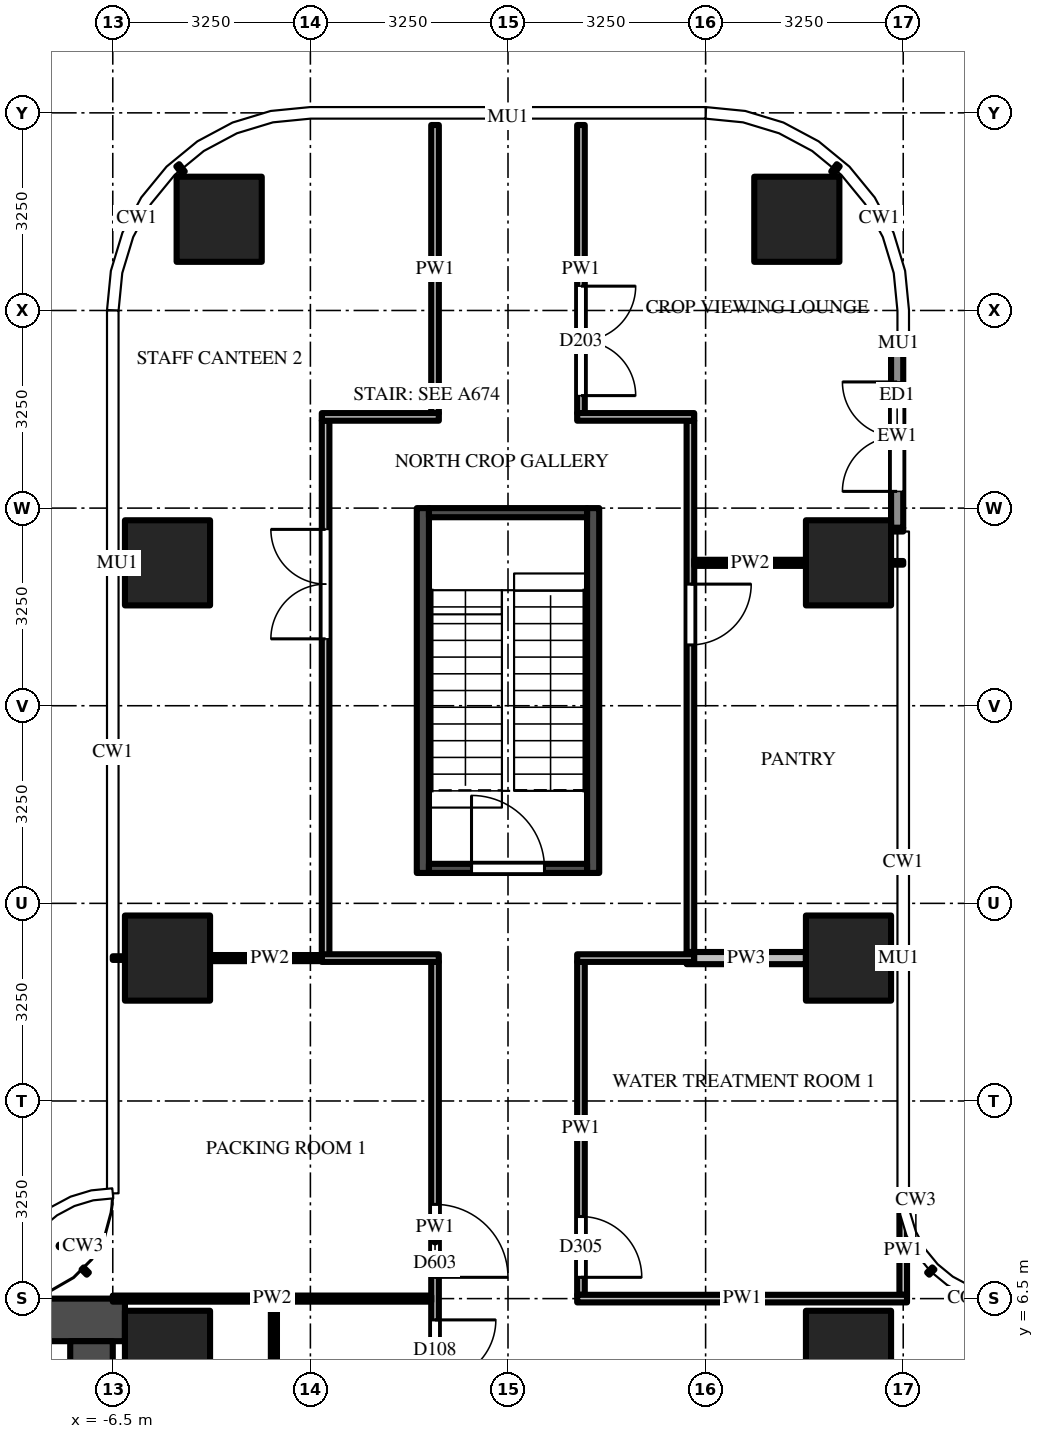
"""IFC4 building model, lengths in metres.
Left out: names, types, materials, properties, quantities, classifications, styles, units other than length and angle.
Written with IfcOpenShell. Run it as: python <this file> out.ifc"""

import sys

from ifc_helpers import new_model, si_unit, direction, frame, frame_2d, origin, origin_2d, place, context, subcontext, project, spatial, rectangle, extrude, source, transform, mapped, element, fill, save


model = new_model("IFC4")
c1 = context("Model", 3, precision=1e-05, world=origin(), true_north=direction((0.0, 1.0)))
c2 = subcontext(c1, "Body", "Model", "MODEL_VIEW")
j1 = project(units=[si_unit("LENGTHUNIT", "METRE"), si_unit("PLANEANGLEUNIT", "RADIAN")], contexts=[c1])
p1 = place(None, origin())
s1 = spatial("IfcSite", under=j1, at=p1, CompositionType="ELEMENT")
p2 = place(p1, origin())
s2 = spatial("IfcBuilding", under=s1, at=p2, CompositionType="ELEMENT")
p3 = place(p2, frame((0.0, 0.0, 83.5)))
s3 = spatial("IfcBuildingStorey", under=s2, at=p3, CompositionType="ELEMENT", Elevation=83.5)
m1 = source(origin(), c2, "Body", "SweptSolid", [
    extrude(rectangle(XDim=1.4, YDim=1.4, at=origin_2d()), origin(), (0.0, 0.0, 1.0), 4.5),
])
for number, where, z_axis, x_axis in (
    (1, (-5.6, 12.1, 0.0), (0.0, 0.0, 1.0), (1.0, 0.0, 0.0)),
    (2, (-5.6, 18.6, 0.0), (0.0, 0.0, 1.0), (1.0, 0.0, 0.0)),
    (3, (-4.75, 24.25, 0.0), (0.0, 0.0, 1.0), (1.0, 0.0, 0.0)),
    (4, (5.6, 12.1, 0.0), (0.0, 0.0, 1.0), (1.0, 0.0, 0.0)),
    (5, (5.6, 18.6, 0.0), (0.0, 0.0, 1.0), (1.0, 0.0, 0.0)),
    (6, (4.75, 24.25, 0.0), (0.0, 0.0, 1.0), (1.0, 0.0, 0.0)),
    (7, (5.6, 5.6, 0.0), (0.0, 0.0, 1.0), (1.0, 0.0, 0.0)),
    (8, (-5.6, 5.6, 0.0), (0.0, 0.0, 1.0), (1.0, 0.0, 0.0)),
):
    element("IfcColumn", number, at=place(p3, frame(where, z_axis=z_axis, x_axis=x_axis)), inside=s3, PredefinedType="COLUMN", context=c2, shape_type="MappedRepresentation", body=[
        mapped(m1, transform((0.0, 0.0, 0.0))),
    ])
m2 = source(origin(), c2, "Body", "SweptSolid", [
    extrude(rectangle(XDim=16.45, YDim=0.7, at=frame_2d((8.225, 0.0))), origin(), (0.0, 0.0, 1.0), 4.25),
])
p4 = place(p3, frame((-6.3, 6.15, 0.0), z_axis=(0.0, 0.0, 1.0), x_axis=(-1.0, 0.0, 0.0)))
e9 = element("IfcWall", 9, at=p4, inside=s3, PredefinedType="SHEAR", context=c2, shape_type="MappedRepresentation", body=[
    mapped(m2, transform((0.0, 0.0, 0.0))),
])
m3 = source(origin(), c2, "Body", "SweptSolid", [
    extrude(rectangle(XDim=9.05, YDim=0.7, at=frame_2d((4.525, 0.0))), origin(), (0.0, 0.0, 1.0), 4.25),
])
p5 = place(p3, frame((-6.85, 5.8, 0.0), z_axis=(0.0, 0.0, 1.0), x_axis=(0.0, -1.0, 0.0)))
e10 = element("IfcWall", 10, at=p5, inside=s3, PredefinedType="SHEAR", context=c2, shape_type="MappedRepresentation", body=[
    mapped(m3, transform((0.0, 0.0, 0.0))),
])
m4 = source(origin(), c2, "Body", "SweptSolid", [
    extrude(rectangle(XDim=1.8, YDim=2.1, at=frame_2d((0.9, 1.05))), frame((0.0, 0.36, 0.0), z_axis=(0.0, -1.0, 0.0), x_axis=(1.0, 0.0, 0.0)), (0.0, 0.0, 1.0), 0.72),
])
p6 = place(p5, frame((3.15, 0.0, 0.0)))
e11 = element("IfcOpeningElement", 11, at=p6, cuts=e10, PredefinedType="OPENING", context=c2, shape_type="MappedRepresentation", body=[
    mapped(m4, transform((0.0, 0.0, 0.0))),
])
m5 = source(origin(), c2, "Body", "SweptSolid", [
    extrude(rectangle(XDim=6.0, YDim=0.2, at=frame_2d((3.0, 0.0))), origin(), (0.0, 0.0, 1.0), 4.25),
])
for number, where, z_axis, x_axis in (
    (12, (-1.4, 13.5, 0.0), (0.0, 0.0, 1.0), (0.0, 1.0, 0.0)),
    (13, (1.4, 13.5, 0.0), (0.0, 0.0, 1.0), (0.0, 1.0, 0.0)),
):
    element("IfcWall", number, at=place(p3, frame(where, z_axis=z_axis, x_axis=x_axis)), inside=s3, PredefinedType="SHEAR", context=c2, shape_type="MappedRepresentation", body=[
        mapped(m5, transform((0.0, 0.0, 0.0))),
    ])
m6 = source(origin(), c2, "Body", "SweptSolid", [
    extrude(rectangle(XDim=2.6, YDim=0.15, at=frame_2d((1.3, 0.0))), origin(), (0.0, 0.0, 1.0), 4.25),
])
p7 = place(p3, frame((-1.3, 13.575, 0.0), z_axis=(0.0, 0.0, 1.0), x_axis=(1.0, 0.0, 0.0)))
e14 = element("IfcWall", 14, at=p7, inside=s3, PredefinedType="SHEAR", context=c2, shape_type="MappedRepresentation", body=[
    mapped(m6, transform((0.0, 0.0, 0.0))),
])
m7 = source(origin(), c2, "Body", "SweptSolid", [
    extrude(rectangle(XDim=1.2, YDim=2.1, at=frame_2d((0.6, 1.05))), frame((0.0, 0.085, 0.0), z_axis=(0.0, -1.0, 0.0), x_axis=(1.0, 0.0, 0.0)), (0.0, 0.0, 1.0), 0.17),
])
p8 = place(p7, frame((0.7, 0.0, 0.0)))
e15 = element("IfcOpeningElement", 15, at=p8, cuts=e14, PredefinedType="OPENING", context=c2, shape_type="MappedRepresentation", body=[
    mapped(m7, transform((0.0, 0.0, 0.0))),
])
p9 = place(p3, frame((-1.3, 19.425, 0.0), z_axis=(0.0, 0.0, 1.0), x_axis=(1.0, 0.0, 0.0)))
e16 = element("IfcWall", 16, at=p9, inside=s3, PredefinedType="SHEAR", context=c2, shape_type="MappedRepresentation", body=[
    mapped(m6, transform((0.0, 0.0, 0.0))),
])
m8 = source(origin(), c2, "Body", "SweptSolid", [
    extrude(rectangle(XDim=3.0, YDim=0.2, at=frame_2d((1.5, 0.0))), origin(), (0.0, 0.0, 1.0), 4.25),
])
p10 = place(p3, frame((6.4, 19.175, 0.0), z_axis=(0.0, 0.0, 1.0), x_axis=(0.0, 1.0, 0.0)))
e17 = element("IfcWall", 17, at=p10, inside=s3, PredefinedType="SOLIDWALL", context=c2, shape_type="MappedRepresentation", body=[
    mapped(m8, transform((0.0, 0.0, 0.0))),
])
m9 = source(origin(), c2, "Body", "SweptSolid", [
    extrude(rectangle(XDim=1.8, YDim=2.4, at=frame_2d((0.9, 1.2))), frame((0.0, 0.11, 0.0), z_axis=(0.0, -1.0, 0.0), x_axis=(1.0, 0.0, 0.0)), (0.0, 0.0, 1.0), 0.22),
])
p11 = place(p10, frame((0.6, 0.0, 0.0)))
e18 = element("IfcOpeningElement", 18, at=p11, cuts=e17, PredefinedType="OPENING", context=c2, shape_type="MappedRepresentation", body=[
    mapped(m9, transform((0.0, 0.0, 0.0))),
])
m10 = source(origin(), c2, "Body", "SweptSolid", [
    extrude(rectangle(XDim=3.137, YDim=0.1, at=frame_2d((1.569, 0.0))), origin(), (0.0, 0.0, 1.0), 3.468),
])
p12 = place(p3, frame((-3.85, 3.312, 0.0), z_axis=(0.0, 0.0, 1.0), x_axis=(0.0, 1.0, 0.0)))
e19 = element("IfcWall", 19, at=p12, inside=s3, PredefinedType="PARTITIONING", context=c2, shape_type="MappedRepresentation", body=[
    mapped(m10, transform((0.0, 0.0, 0.0))),
])
m11 = source(origin(), c2, "Body", "SweptSolid", [
    extrude(rectangle(XDim=8.788, YDim=0.125, at=frame_2d((4.394, 0.0))), origin(), (0.0, 0.0, 1.0), 3.468),
])
p13 = place(p3, frame((-3.0, 12.15, 0.0), z_axis=(0.0, 0.0, 1.0), x_axis=(0.0, 1.0, 0.0)))
e20 = element("IfcWall", 20, at=p13, inside=s3, PredefinedType="PARTITIONING", context=c2, shape_type="MappedRepresentation", body=[
    mapped(m11, transform((0.0, 0.0, 0.0))),
])
m12 = source(origin(), c2, "Body", "SweptSolid", [
    extrude(rectangle(XDim=1.8, YDim=2.1, at=frame_2d((0.9, 1.05))), frame((0.0, 0.073, 0.0), z_axis=(0.0, -1.0, 0.0), x_axis=(1.0, 0.0, 0.0)), (0.0, 0.0, 1.0), 0.145),
])
p14 = place(p13, frame((5.2, 0.0, 0.0)))
e21 = element("IfcOpeningElement", 21, at=p14, cuts=e20, PredefinedType="OPENING", context=c2, shape_type="MappedRepresentation", body=[
    mapped(m12, transform((0.0, 0.0, 0.0))),
])
m13 = source(origin(), c2, "Body", "SweptSolid", [
    extrude(rectangle(XDim=8.725, YDim=0.125, at=frame_2d((4.363, 0.0))), origin(), (0.0, 0.0, 1.0), 3.468),
])
p15 = place(p3, frame((-1.2, 12.038, 0.0), z_axis=(0.0, 0.0, 1.0), x_axis=(0.0, -1.0, 0.0)))
e22 = element("IfcWall", 22, at=p15, inside=s3, PredefinedType="PARTITIONING", context=c2, shape_type="MappedRepresentation", body=[
    mapped(m13, transform((0.0, 0.0, 0.0))),
])
m14 = source(origin(), c2, "Body", "SweptSolid", [
    extrude(rectangle(XDim=1.0, YDim=2.1, at=frame_2d((0.5, 1.05))), frame((0.0, 0.073, 0.0), z_axis=(0.0, -1.0, 0.0), x_axis=(1.0, 0.0, 0.0)), (0.0, 0.0, 1.0), 0.145),
])
p16 = place(p15, frame((5.887, 0.0, 0.0)))
e23 = element("IfcOpeningElement", 23, at=p16, cuts=e22, PredefinedType="OPENING", context=c2, shape_type="MappedRepresentation", body=[
    mapped(m14, transform((0.0, 0.0, 0.0))),
])
m15 = source(origin(), c2, "Body", "SweptSolid", [
    extrude(rectangle(XDim=1.2, YDim=2.1, at=frame_2d((0.6, 1.05))), frame((0.0, 0.073, 0.0), z_axis=(0.0, -1.0, 0.0), x_axis=(1.0, 0.0, 0.0)), (0.0, 0.0, 1.0), 0.145),
])
p17 = place(p15, frame((3.988, 0.0, 0.0)))
e24 = element("IfcOpeningElement", 24, at=p17, cuts=e22, PredefinedType="OPENING", context=c2, shape_type="MappedRepresentation", body=[
    mapped(m15, transform((0.0, 0.0, 0.0))),
])
m16 = source(origin(), c2, "Body", "SweptSolid", [
    extrude(rectangle(XDim=4.738, YDim=0.125, at=frame_2d((2.369, 0.0))), origin(), (0.0, 0.0, 1.0), 3.33),
])
p18 = place(p3, frame((-1.2, 25.8, 0.0), z_axis=(0.0, 0.0, 1.0), x_axis=(0.0, -1.0, 0.0)))
e25 = element("IfcWall", 25, at=p18, inside=s3, PredefinedType="PARTITIONING", context=c2, shape_type="MappedRepresentation", body=[
    mapped(m16, transform((0.0, 0.0, 0.0))),
])
m17 = source(origin(), c2, "Body", "SweptSolid", [
    extrude(rectangle(XDim=5.475, YDim=0.125, at=frame_2d((2.738, 0.0))), origin(), (0.0, 0.0, 1.0), 3.468),
])
p19 = place(p3, frame((1.2, 12.038, 0.0), z_axis=(0.0, 0.0, 1.0), x_axis=(0.0, -1.0, 0.0)))
e26 = element("IfcWall", 26, at=p19, inside=s3, PredefinedType="PARTITIONING", context=c2, shape_type="MappedRepresentation", body=[
    mapped(m17, transform((0.0, 0.0, 0.0))),
])
p20 = place(p19, frame((4.188, 0.0, 0.0)))
e27 = element("IfcOpeningElement", 27, at=p20, cuts=e26, PredefinedType="OPENING", context=c2, shape_type="MappedRepresentation", body=[
    mapped(m14, transform((0.0, 0.0, 0.0))),
])
p21 = place(p3, frame((1.2, 25.8, 0.0), z_axis=(0.0, 0.0, 1.0), x_axis=(0.0, -1.0, 0.0)))
e28 = element("IfcWall", 28, at=p21, inside=s3, PredefinedType="PARTITIONING", context=c2, shape_type="MappedRepresentation", body=[
    mapped(m16, transform((0.0, 0.0, 0.0))),
])
p22 = place(p21, frame((2.65, 0.0, 0.0)))
e29 = element("IfcOpeningElement", 29, at=p22, cuts=e28, PredefinedType="OPENING", context=c2, shape_type="MappedRepresentation", body=[
    mapped(m12, transform((0.0, 0.0, 0.0))),
])
m18 = source(origin(), c2, "Body", "SweptSolid", [
    extrude(rectangle(XDim=8.738, YDim=0.125, at=frame_2d((4.369, 0.0))), origin(), (0.0, 0.0, 1.0), 3.468),
])
p23 = place(p3, frame((3.0, 20.938, 0.0), z_axis=(0.0, 0.0, 1.0), x_axis=(0.0, -1.0, 0.0)))
e30 = element("IfcWall", 30, at=p23, inside=s3, PredefinedType="PARTITIONING", context=c2, shape_type="MappedRepresentation", body=[
    mapped(m18, transform((0.0, 0.0, 0.0))),
])
p24 = place(p23, frame((2.688, 0.0, 0.0)))
e31 = element("IfcOpeningElement", 31, at=p24, cuts=e30, PredefinedType="OPENING", context=c2, shape_type="MappedRepresentation", body=[
    mapped(m14, transform((0.0, 0.0, 0.0))),
])
m19 = source(origin(), c2, "Body", "SweptSolid", [
    extrude(rectangle(XDim=1.469, YDim=0.125, at=frame_2d((0.734, 0.0))), origin(), (0.0, 0.0, 1.0), 4.25),
])
p25 = place(p3, frame((6.5, 6.562, 0.0), z_axis=(0.0, 0.0, 1.0), x_axis=(0.0, 1.0, 0.0)))
e32 = element("IfcWall", 32, at=p25, inside=s3, PredefinedType="PARTITIONING", context=c2, shape_type="MappedRepresentation", body=[
    mapped(m19, transform((0.0, 0.0, 0.0))),
])
m20 = source(origin(), c2, "Body", "SweptSolid", [
    extrude(rectangle(XDim=5.238, YDim=0.1, at=frame_2d((2.619, 0.0))), origin(), (0.0, 0.0, 1.0), 3.33),
])
p26 = place(p3, frame((-6.5, 6.5, 0.0), z_axis=(0.0, 0.0, 1.0), x_axis=(1.0, 0.0, 0.0)))
e33 = element("IfcWall", 33, at=p26, inside=s3, PredefinedType="PARTITIONING", context=c2, shape_type="MappedRepresentation", body=[
    mapped(m20, transform((0.0, 0.0, 0.0))),
])
m21 = source(origin(), c2, "Body", "SweptSolid", [
    extrude(rectangle(XDim=5.425, YDim=0.125, at=frame_2d((2.712, 0.0))), origin(), (0.0, 0.0, 1.0), 3.33),
])
p27 = place(p3, frame((1.137, 6.5, 0.0), z_axis=(0.0, 0.0, 1.0), x_axis=(1.0, 0.0, 0.0)))
e34 = element("IfcWall", 34, at=p27, inside=s3, PredefinedType="PARTITIONING", context=c2, shape_type="MappedRepresentation", body=[
    mapped(m21, transform((0.0, 0.0, 0.0))),
])
m22 = source(origin(), c2, "Body", "SweptSolid", [
    extrude(rectangle(XDim=1.962, YDim=0.2, at=frame_2d((0.981, 0.0))), origin(), (0.0, 0.0, 1.0), 3.468),
])
p28 = place(p3, frame((2.938, 12.1, 0.0), z_axis=(0.0, 0.0, 1.0), x_axis=(1.0, 0.0, 0.0)))
e35 = element("IfcWall", 35, at=p28, inside=s3, PredefinedType="PARTITIONING", context=c2, shape_type="MappedRepresentation", body=[
    mapped(m22, transform((0.0, 0.0, 0.0))),
])
m23 = source(origin(), c2, "Body", "SweptSolid", [
    extrude(rectangle(XDim=1.962, YDim=0.1, at=frame_2d((0.981, 0.0))), origin(), (0.0, 0.0, 1.0), 3.468),
])
p29 = place(p3, frame((-4.9, 12.1, 0.0), z_axis=(0.0, 0.0, 1.0), x_axis=(1.0, 0.0, 0.0)))
e36 = element("IfcWall", 36, at=p29, inside=s3, PredefinedType="PARTITIONING", context=c2, shape_type="MappedRepresentation", body=[
    mapped(m23, transform((0.0, 0.0, 0.0))),
])
m24 = source(origin(), c2, "Body", "SweptSolid", [
    extrude(rectangle(XDim=1.925, YDim=0.125, at=frame_2d((0.962, 0.0))), origin(), (0.0, 0.0, 1.0), 3.468),
])
for number, where, z_axis, x_axis in (
    (37, (-1.137, 12.1, 0.0), (0.0, 0.0, 1.0), (-1.0, 0.0, 0.0)),
    (38, (3.062, 12.1, 0.0), (0.0, 0.0, 1.0), (-1.0, 0.0, 0.0)),
):
    element("IfcWall", number, at=place(p3, frame(where, z_axis=z_axis, x_axis=x_axis)), inside=s3, PredefinedType="PARTITIONING", context=c2, shape_type="MappedRepresentation", body=[
        mapped(m24, transform((0.0, 0.0, 0.0))),
    ])
m25 = source(origin(), c2, "Body", "SweptSolid", [
    extrude(rectangle(XDim=1.837, YDim=0.1, at=frame_2d((0.919, 0.0))), origin(), (0.0, 0.0, 1.0), 3.697),
])
p30 = place(p3, frame((3.062, 18.6, 0.0), z_axis=(0.0, 0.0, 1.0), x_axis=(1.0, 0.0, 0.0)))
e39 = element("IfcWall", 39, at=p30, inside=s3, PredefinedType="PARTITIONING", context=c2, shape_type="MappedRepresentation", body=[
    mapped(m25, transform((0.0, 0.0, 0.0))),
])
m26 = source(origin(), c2, "Body", "SweptSolid", [
    extrude(rectangle(XDim=1.925, YDim=0.125, at=frame_2d((0.962, 0.0))), origin(), (0.0, 0.0, 1.0), 4.25),
])
for number, where, z_axis, x_axis in (
    (40, (-3.062, 21.0, 0.0), (0.0, 0.0, 1.0), (1.0, 0.0, 0.0)),
    (41, (1.137, 21.0, 0.0), (0.0, 0.0, 1.0), (1.0, 0.0, 0.0)),
):
    element("IfcWall", number, at=place(p3, frame(where, z_axis=z_axis, x_axis=x_axis)), inside=s3, PredefinedType="PARTITIONING", context=c2, shape_type="MappedRepresentation", body=[
        mapped(m26, transform((0.0, 0.0, 0.0))),
    ])
m27 = source(origin(), c2, "Body", "SweptSolid", [
    extrude(rectangle(XDim=1.2, YDim=2.1, at=frame_2d((0.6, 1.05))), frame((0.0, 0.025, 0.0), z_axis=(0.0, -1.0, 0.0), x_axis=(1.0, 0.0, 0.0)), (0.0, 0.0, 1.0), 0.05),
])
p31 = place(p8, origin())
e42 = element("IfcDoor", 42, at=p31, inside=s3, OperationType="SINGLE_SWING_LEFT", PredefinedType="DOOR", context=c2, shape_type="MappedRepresentation", body=[
    mapped(m27, transform((0.0, 0.0, 0.0))),
])
fill(e15, e42)
m28 = source(origin(), c2, "Body", "SweptSolid", [
    extrude(rectangle(XDim=1.8, YDim=2.4, at=frame_2d((0.9, 1.2))), frame((0.0, 0.025, 0.0), z_axis=(0.0, -1.0, 0.0), x_axis=(1.0, 0.0, 0.0)), (0.0, 0.0, 1.0), 0.05),
])
p32 = place(p11, origin())
e43 = element("IfcDoor", 43, at=p32, inside=s3, OperationType="DOUBLE_DOOR_SINGLE_SWING", PredefinedType="DOOR", context=c2, shape_type="MappedRepresentation", body=[
    mapped(m28, transform((0.0, 0.0, 0.0))),
])
fill(e18, e43)
m29 = source(origin(), c2, "Body", "SweptSolid", [
    extrude(rectangle(XDim=1.0, YDim=2.1, at=frame_2d((0.5, 1.05))), frame((0.0, 0.025, 0.0), z_axis=(0.0, -1.0, 0.0), x_axis=(1.0, 0.0, 0.0)), (0.0, 0.0, 1.0), 0.05),
])
p33 = place(p16, origin())
e44 = element("IfcDoor", 44, at=p33, inside=s3, OperationType="SINGLE_SWING_LEFT", PredefinedType="DOOR", context=c2, shape_type="MappedRepresentation", body=[
    mapped(m29, transform((0.0, 0.0, 0.0))),
])
fill(e23, e44)
p34 = place(p20, origin())
e45 = element("IfcDoor", 45, at=p34, inside=s3, OperationType="SINGLE_SWING_RIGHT", PredefinedType="DOOR", context=c2, shape_type="MappedRepresentation", body=[
    mapped(m29, transform((0.0, 0.0, 0.0))),
])
fill(e27, e45)
p35 = place(p17, origin())
e46 = element("IfcDoor", 46, at=p35, inside=s3, OperationType="SINGLE_SWING_RIGHT", PredefinedType="DOOR", context=c2, shape_type="MappedRepresentation", body=[
    mapped(m27, transform((0.0, 0.0, 0.0))),
])
fill(e24, e46)
p36 = place(p24, origin())
e47 = element("IfcDoor", 47, at=p36, inside=s3, OperationType="SINGLE_SWING_LEFT", PredefinedType="DOOR", context=c2, shape_type="MappedRepresentation", body=[
    mapped(m29, transform((0.0, 0.0, 0.0))),
])
fill(e31, e47)
m30 = source(origin(), c2, "Body", "SweptSolid", [
    extrude(rectangle(XDim=1.8, YDim=2.1, at=frame_2d((0.9, 1.05))), frame((0.0, 0.025, 0.0), z_axis=(0.0, -1.0, 0.0), x_axis=(1.0, 0.0, 0.0)), (0.0, 0.0, 1.0), 0.05),
])
p37 = place(p14, origin())
e48 = element("IfcDoor", 48, at=p37, inside=s3, OperationType="DOUBLE_DOOR_SINGLE_SWING", PredefinedType="DOOR", context=c2, shape_type="MappedRepresentation", body=[
    mapped(m30, transform((0.0, 0.0, 0.0))),
])
fill(e21, e48)
p38 = place(p22, origin())
e49 = element("IfcDoor", 49, at=p38, inside=s3, OperationType="DOUBLE_DOOR_SINGLE_SWING", PredefinedType="DOOR", context=c2, shape_type="MappedRepresentation", body=[
    mapped(m30, transform((0.0, 0.0, 0.0))),
])
fill(e29, e49)
save(model, sys.argv[1])
